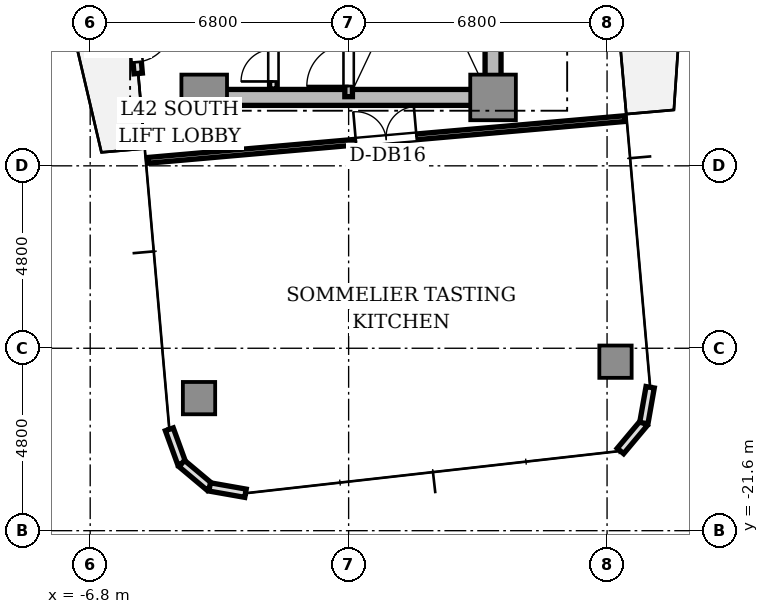
"""IFC4 building model, lengths in metres.
Left out: names, types, materials, properties, quantities, classifications, styles, units other than length and angle.
Written with IfcOpenShell. Run it as: python <this file> out.ifc"""

import sys

from ifc_helpers import new_model, si_unit, direction, frame, frame_2d, origin, origin_2d, place, context, subcontext, project, spatial, rectangle, extrude, source, transform, mapped, element, fill, save


model = new_model("IFC4")
c1 = context("Model", 3, precision=1e-05, world=origin(), true_north=direction((0.0, 1.0)))
c2 = subcontext(c1, "Body", "Model", "MODEL_VIEW")
j1 = project(units=[si_unit("LENGTHUNIT", "METRE"), si_unit("PLANEANGLEUNIT", "RADIAN")], contexts=[c1])
p1 = place(None, origin())
s1 = spatial("IfcSite", under=j1, at=p1, CompositionType="ELEMENT")
p2 = place(p1, origin())
s2 = spatial("IfcBuilding", under=s1, at=p2, CompositionType="ELEMENT")
p3 = place(p2, frame((0.0, 0.0, 153.95)))
s3 = spatial("IfcBuildingStorey", under=s2, at=p3, CompositionType="ELEMENT", Elevation=153.95)
p4 = place(p3, frame((-3.55, -10.2, 0.0), z_axis=(0.0, 0.0, 1.0), x_axis=(1.0, 0.0, 0.0)))
e1 = element("IfcWall", 1, at=p4, inside=s3, PredefinedType="SHEAR", context=c2, shape_type="SweptSolid", body=[
    extrude(rectangle(XDim=7.1, YDim=0.42, at=frame_2d((3.55, 0.0))), origin(), (0.0, 0.0, 1.0), 3.11),
])
p5 = place(p3, frame((3.8, -9.75, 0.0), z_axis=(0.0, 0.0, 1.0), x_axis=(0.0, 1.0, 0.0)))
e2 = element("IfcWall", 2, at=p5, inside=s3, PredefinedType="SHEAR", context=c2, shape_type="SweptSolid", body=[
    extrude(rectangle(XDim=6.9, YDim=0.42, at=frame_2d((3.45, 0.0))), origin(), (0.0, 0.0, 1.0), 3.11),
])
m1 = source(origin(), c2, "Body", "SweptSolid", [
    extrude(rectangle(XDim=1.2, YDim=1.2, at=origin_2d()), origin(), (0.0, 0.0, 1.0), 3.11),
])
for number, where, z_axis, x_axis in (
    (3, (-3.8, -10.2, 0.0), (0.0, 0.0, 1.0), (1.0, 0.0, 0.0)),
    (4, (3.8, -10.2, 0.0), (0.0, 0.0, 1.0), (1.0, 0.0, 0.0)),
):
    element("IfcColumn", number, at=place(p3, frame(where, z_axis=z_axis, x_axis=x_axis)), inside=s3, PredefinedType="COLUMN", context=c2, shape_type="MappedRepresentation", body=[
        mapped(m1, transform((0.0, 0.0, 0.0), scale=1.0)),
    ])
m2 = source(origin(), c2, "Body", "SweptSolid", [
    extrude(rectangle(XDim=0.85, YDim=0.85, at=origin_2d()), origin(), (0.0, 0.0, 1.0), 3.11),
])
for number, where, z_axis, x_axis in (
    (5, (-3.936, -18.112, 0.0), (0.0, 0.0, 1.0), (1.0, 0.0, 0.0)),
    (6, (7.022, -17.153, 0.0), (0.0, 0.0, 1.0), (1.0, 0.0, 0.0)),
):
    element("IfcColumn", number, at=place(p3, frame(where, z_axis=z_axis, x_axis=x_axis)), inside=s3, PredefinedType="COLUMN", context=c2, shape_type="MappedRepresentation", body=[
        mapped(m2, transform((0.0, 0.0, 0.0), scale=1.0)),
    ])
p6 = place(p3, frame((-5.772, -6.879, 0.0), z_axis=(0.0, 0.0, 1.0), x_axis=(0.087168071984, -0.996193619346, 0.0)))
e7 = element("IfcWall", 7, at=p6, inside=s3, PredefinedType="STANDARD", context=c2, shape_type="SweptSolid", body=[
    extrude(rectangle(XDim=2.7, YDim=0.22, at=frame_2d((1.35, 0.0))), origin(), (0.0, 0.0, 1.0), 3.11),
])
p7 = place(p6, frame((1.4, 0.0, 0.0)))
e8 = element("IfcOpeningElement", 8, at=p7, cuts=e7, PredefinedType="OPENING", context=c2, shape_type="SweptSolid", body=[
    extrude(rectangle(XDim=1.0, YDim=2.2, at=frame_2d((0.5, 1.1))), frame((0.0, 0.12, 0.0), z_axis=(0.0, -1.0, 0.0), x_axis=(1.0, 0.0, 0.0)), (0.0, 0.0, 1.0), 0.24),
])
p8 = place(p3, frame((-4.718, -18.933, 0.0), z_axis=(0.0, 0.0, 1.0), x_axis=(0.34188635151, -0.939741306239, 0.0)))
e9 = element("IfcWall", 9, at=p8, inside=s3, PredefinedType="STANDARD", context=c2, shape_type="SweptSolid", body=[
    extrude(rectangle(XDim=0.958, YDim=0.22, at=frame_2d((0.479, 0.0))), origin(), (0.0, 0.0, 1.0), 3.11),
])
for number, where, z_axis, x_axis in (
    (10, (-4.39, -19.833, 0.0), (0.0, 0.0, 1.0), (0.766, -0.643, 0.0)),
    (11, (-3.657, -20.449, 0.0), (0.0, 0.0, 1.0), (0.985, -0.174, 0.0)),
):
    element("IfcWall", number, at=place(p3, frame(where, z_axis=z_axis, x_axis=x_axis)), inside=s3, PredefinedType="STANDARD", context=c2, shape_type="SweptSolid", body=[
        extrude(rectangle(XDim=0.958, YDim=0.22, at=frame_2d((0.479, 0.0))), origin(), (0.0, 0.0, 1.0), 3.11),
    ])
for number, where, z_axis, x_axis in (
    (12, (7.152, -19.503, 0.0), (0.0, 0.0, 1.0), (0.643, 0.766, 0.0)),
    (13, (7.768, -18.769, 0.0), (0.0, 0.0, 1.0), (0.174, 0.985, 0.0)),
):
    element("IfcWall", number, at=place(p3, frame(where, z_axis=z_axis, x_axis=x_axis)), inside=s3, PredefinedType="STANDARD", context=c2, shape_type="SweptSolid", body=[
        extrude(rectangle(XDim=0.958, YDim=0.22, at=frame_2d((0.479, 0.0))), origin(), (0.0, 0.0, 1.0), 3.11),
    ])
p9 = place(p3, frame((0.0, -10.18, 0.0), z_axis=(0.0, 0.0, 1.0), x_axis=(0.0, 1.0, 0.0)))
e14 = element("IfcWall", 14, at=p9, inside=s3, PredefinedType="SOLIDWALL", context=c2, shape_type="SweptSolid", body=[
    extrude(rectangle(XDim=7.68, YDim=0.2, at=frame_2d((3.84, 0.0))), origin(), (0.0, 0.0, 1.0), 3.11),
])
p10 = place(p9, frame((0.28, 0.0, 0.0)))
e15 = element("IfcOpeningElement", 15, at=p10, cuts=e14, PredefinedType="OPENING", context=c2, shape_type="SweptSolid", body=[
    extrude(rectangle(XDim=1.1, YDim=2.15, at=frame_2d((0.55, 1.075))), frame((0.0, 0.11, 0.0), z_axis=(0.0, -1.0, 0.0), x_axis=(1.0, 0.0, 0.0)), (0.0, 0.0, 1.0), 0.22),
])
p11 = place(p3, frame((-1.98, -9.98, 0.0), z_axis=(0.0, 0.0, 1.0), x_axis=(0.0, 1.0, 0.0)))
e16 = element("IfcWall", 16, at=p11, inside=s3, PredefinedType="SOLIDWALL", context=c2, shape_type="SweptSolid", body=[
    extrude(rectangle(XDim=4.66, YDim=0.2, at=frame_2d((2.33, 0.0))), origin(), (0.0, 0.0, 1.0), 2.66),
])
p12 = place(p11, frame((0.2, 0.0, 0.0)))
e17 = element("IfcOpeningElement", 17, at=p12, cuts=e16, PredefinedType="OPENING", context=c2, shape_type="SweptSolid", body=[
    extrude(rectangle(XDim=0.85, YDim=2.1, at=frame_2d((0.425, 1.05))), frame((0.0, 0.11, 0.0), z_axis=(0.0, -1.0, 0.0), x_axis=(1.0, 0.0, 0.0)), (0.0, 0.0, 1.0), 0.22),
])
p13 = place(p3, frame((-5.287, -11.856, 0.0), z_axis=(0.0, 0.0, 1.0), x_axis=(0.996194790044, 0.087154691724, 0.0)))
e18 = element("IfcWall", 18, at=p13, inside=s3, PredefinedType="PARTITIONING", context=c2, shape_type="SweptSolid", body=[
    extrude(rectangle(XDim=12.6, YDim=0.15, at=frame_2d((6.3, 0.0))), origin(), (0.0, 0.0, 1.0), 2.66),
])
p14 = place(p13, frame((5.5, 0.0, 0.0)))
e19 = element("IfcOpeningElement", 19, at=p14, cuts=e18, PredefinedType="OPENING", context=c2, shape_type="SweptSolid", body=[
    extrude(rectangle(XDim=1.6, YDim=2.25, at=frame_2d((0.8, 1.125))), frame((0.0, 0.085, 0.0), z_axis=(0.0, -1.0, 0.0), x_axis=(1.0, 0.0, 0.0)), (0.0, 0.0, 1.0), 0.17),
])
m3 = source(origin(), c2, "Body", "SweptSolid", [
    extrude(rectangle(XDim=1.0, YDim=0.05, at=origin_2d()), origin(), (0.0, 0.0, 1.0), 2.2),
])
p15 = place(p7, frame((0.5, 0.0, 0.0)))
e20 = element("IfcDoor", 20, at=p15, inside=s3, OperationType="SINGLE_SWING_LEFT", PredefinedType="DOOR", context=c2, shape_type="MappedRepresentation", body=[
    mapped(m3, transform((0.0, 0.0, 0.0), scale=1.0)),
])
fill(e8, e20)
m4 = source(origin(), c2, "Body", "SweptSolid", [
    extrude(rectangle(XDim=1.1, YDim=0.05, at=origin_2d()), origin(), (0.0, 0.0, 1.0), 2.15),
])
p16 = place(p10, frame((0.55, 0.0, 0.0)))
e21 = element("IfcDoor", 21, at=p16, inside=s3, OperationType="SINGLE_SWING_LEFT", PredefinedType="DOOR", context=c2, shape_type="MappedRepresentation", body=[
    mapped(m4, transform((0.0, 0.0, 0.0), scale=1.0)),
])
fill(e15, e21)
m5 = source(origin(), c2, "Body", "SweptSolid", [
    extrude(rectangle(XDim=0.85, YDim=0.05, at=origin_2d()), origin(), (0.0, 0.0, 1.0), 2.1),
])
p17 = place(p12, frame((0.425, 0.0, 0.0)))
e22 = element("IfcDoor", 22, at=p17, inside=s3, OperationType="SINGLE_SWING_LEFT", PredefinedType="DOOR", context=c2, shape_type="MappedRepresentation", body=[
    mapped(m5, transform((0.0, 0.0, 0.0), scale=1.0)),
])
fill(e17, e22)
m6 = source(origin(), c2, "Body", "SweptSolid", [
    extrude(rectangle(XDim=1.6, YDim=0.05, at=origin_2d()), origin(), (0.0, 0.0, 1.0), 2.25),
])
p18 = place(p14, frame((0.8, 0.0, 0.0)))
e23 = element("IfcDoor", 23, at=p18, inside=s3, OperationType="DOUBLE_DOOR_SINGLE_SWING", PredefinedType="DOOR", context=c2, shape_type="MappedRepresentation", body=[
    mapped(m6, transform((0.0, 0.0, 0.0), scale=1.0)),
])
fill(e19, e23)
save(model, sys.argv[1])
